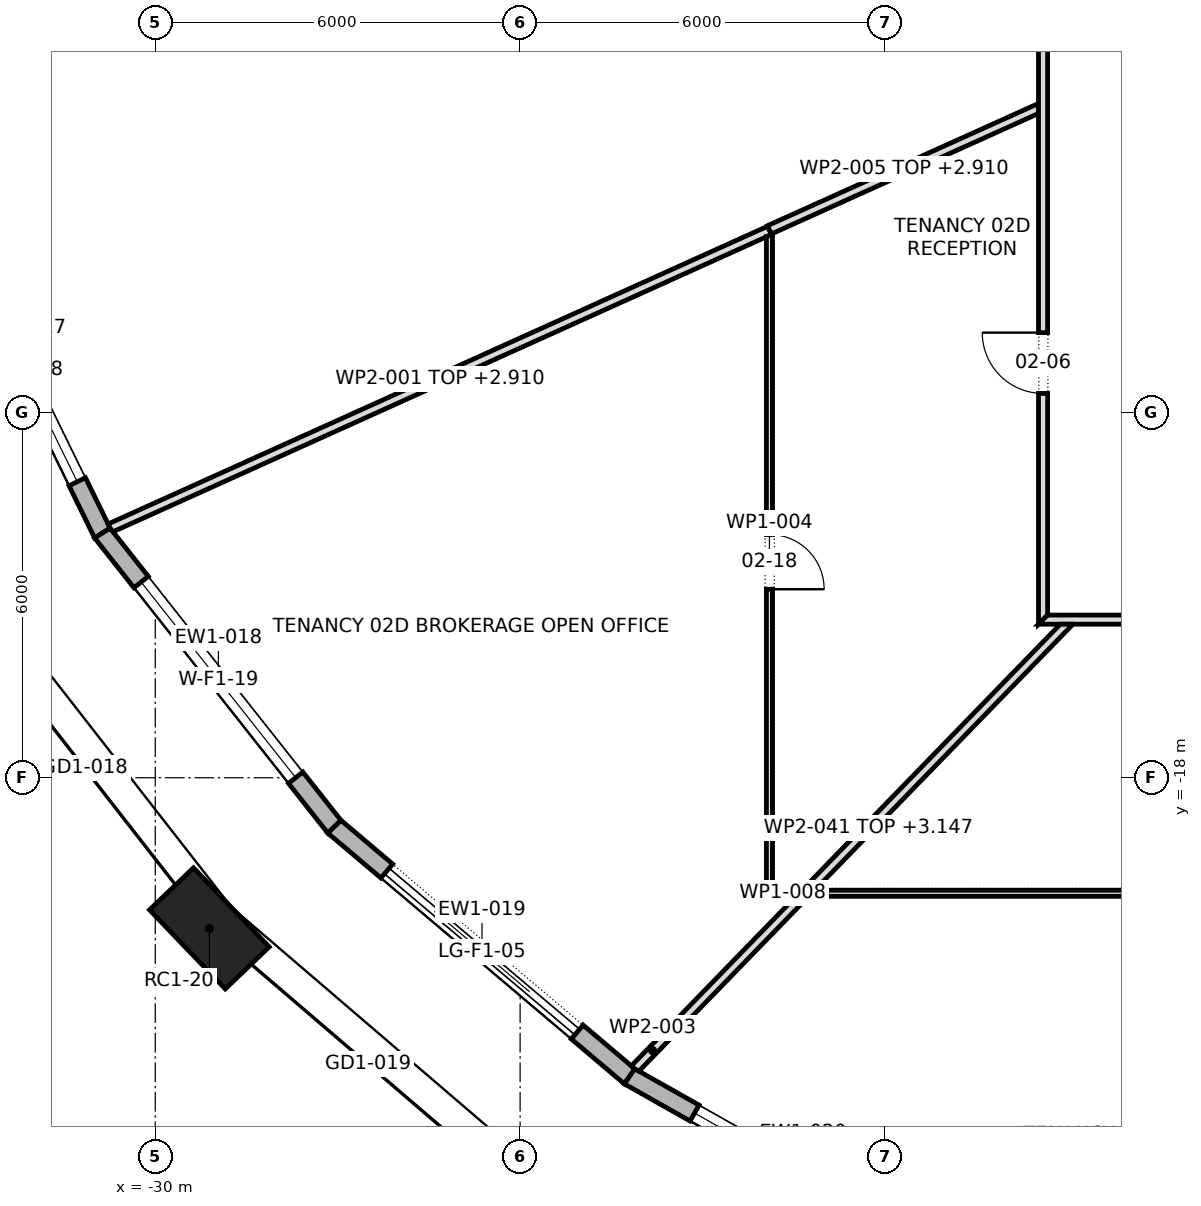
"""IFC4 building model, lengths in metres.
Left out: names, types, materials, properties, quantities, classifications, styles, units other than length and angle.
Written with IfcOpenShell. Run it as: python <this file> out.ifc"""

import sys

from ifc_helpers import new_model, si_unit, direction, frame, frame_2d, origin, origin_2d, place, context, subcontext, project, spatial, polyline, rectangle, outline, extrude, element, fill, save


model = new_model("IFC4")
c1 = context("Model", 3, precision=1e-05, world=origin(), true_north=direction((0.0, 1.0)))
c2 = subcontext(c1, "Body", "Model", "MODEL_VIEW")
j1 = project(units=[si_unit("LENGTHUNIT", "METRE"), si_unit("PLANEANGLEUNIT", "RADIAN")], contexts=[c1])
p1 = place(None, origin())
s1 = spatial("IfcSite", under=j1, at=p1, CompositionType="ELEMENT")
p2 = place(p1, origin())
s2 = spatial("IfcBuilding", under=s1, at=p2, CompositionType="ELEMENT")
p3 = place(p2, frame((0.0, 0.0, 36.1)))
s3 = spatial("IfcBuildingStorey", under=s2, at=p3, CompositionType="ELEMENT", Elevation=36.1)
p4 = place(p3, frame((-29.11, -20.477, 0.0), z_axis=(0.0, 0.0, 1.0), x_axis=(0.691574830638, -0.722304820438, 0.0)))
e1 = element("IfcColumn", 1, at=p4, inside=s3, PredefinedType="COLUMN", context=c2, shape_type="SweptSolid", body=[
    extrude(rectangle(XDim=1.8, YDim=1.0, at=origin_2d()), origin(), (0.0, 0.0, 1.0), 4.2),
])
p5 = place(p3, frame((-33.499, -8.608, 0.0), z_axis=(0.0, 0.0, 1.0), x_axis=(0.439896354052, -0.898048549741, 0.0)))
e2 = element("IfcWall", 2, at=p5, inside=s3, PredefinedType="STANDARD", context=c2, shape_type="SweptSolid", body=[
    extrude(outline(polyline([(-0.017, -0.15), (5.994, -0.15), (5.962, 0.15), (0.017, 0.15), (-0.017, -0.15)])), origin(), (0.0, 0.0, 1.0), 3.9),
])
p6 = place(p5, frame((0.939, 0.0, 0.6)))
e3 = element("IfcOpeningElement", 3, at=p6, cuts=e2, PredefinedType="OPENING", context=c2, shape_type="SweptSolid", body=[
    extrude(rectangle(XDim=4.1, YDim=2.85, at=frame_2d((2.05, 1.425))), frame((0.0, 0.162, 0.0), z_axis=(0.0, -1.0, 0.0), x_axis=(1.0, 0.0, 0.0)), (0.0, 0.0, 1.0), 0.324),
])
p7 = place(p3, frame((-30.869, -13.976, 0.0), z_axis=(0.0, 0.0, 1.0), x_axis=(0.61992334328, -0.784662378642, 0.0)))
e4 = element("IfcWall", 4, at=p7, inside=s3, PredefinedType="STANDARD", context=c2, shape_type="SweptSolid", body=[
    extrude(outline(polyline([(-0.016, -0.15), (6.17, -0.15), (6.14, 0.15), (0.016, 0.15), (-0.016, -0.15)])), origin(), (0.0, 0.0, 1.0), 3.9),
])
p8 = place(p7, frame((1.027, 0.0, 0.6)))
e5 = element("IfcOpeningElement", 5, at=p8, cuts=e4, PredefinedType="OPENING", context=c2, shape_type="SweptSolid", body=[
    extrude(rectangle(XDim=4.1, YDim=2.85, at=frame_2d((2.05, 1.425))), frame((0.0, 0.162, 0.0), z_axis=(0.0, -1.0, 0.0), x_axis=(1.0, 0.0, 0.0)), (0.0, 0.0, 1.0), 0.324),
])
p9 = place(p3, frame((-27.054, -18.806, 0.0), z_axis=(0.0, 0.0, 1.0), x_axis=(0.763577077796, -0.645716691951, 0.0)))
e6 = element("IfcWall", 6, at=p9, inside=s3, PredefinedType="STANDARD", context=c2, shape_type="SweptSolid", body=[
    extrude(outline(polyline([(-0.015, -0.15), (6.371, -0.15), (6.343, 0.15), (0.015, 0.15), (-0.015, -0.15)])), origin(), (0.0, 0.0, 1.0), 3.9),
])
p10 = place(p9, frame((1.129, 0.0, 0.0)))
e7 = element("IfcOpeningElement", 7, at=p10, cuts=e6, PredefinedType="OPENING", context=c2, shape_type="SweptSolid", body=[
    extrude(rectangle(XDim=4.1, YDim=3.45, at=frame_2d((2.05, 1.725))), frame((0.0, 0.162, 0.0), z_axis=(0.0, -1.0, 0.0), x_axis=(1.0, 0.0, 0.0)), (0.0, 0.0, 1.0), 0.324),
])
p11 = place(p3, frame((-22.2, -22.911, 0.0), z_axis=(0.0, 0.0, 1.0), x_axis=(0.87061279013, -0.491968870623, 0.0)))
e8 = element("IfcWall", 8, at=p11, inside=s3, PredefinedType="STANDARD", context=c2, shape_type="SweptSolid", body=[
    extrude(outline(polyline([(-0.014, -0.15), (6.567, -0.15), (6.54, 0.15), (0.014, 0.15), (-0.014, -0.15)])), origin(), (0.0, 0.0, 1.0), 3.9),
])
p12 = place(p11, frame((1.227, 0.0, 0.6)))
e9 = element("IfcOpeningElement", 9, at=p12, cuts=e8, PredefinedType="OPENING", context=c2, shape_type="SweptSolid", body=[
    extrude(rectangle(XDim=4.1, YDim=2.85, at=frame_2d((2.05, 1.425))), frame((0.0, 0.162, 0.0), z_axis=(0.0, -1.0, 0.0), x_axis=(1.0, 0.0, 0.0)), (0.0, 0.0, 1.0), 0.324),
])
p13 = place(p3, frame((-30.744, -13.896, 0.0), z_axis=(0.0, 0.0, 1.0), x_axis=(0.91143189519, 0.411450969654, 0.0)))
e10 = element("IfcWall", 10, at=p13, inside=s3, PredefinedType="PARTITIONING", context=c2, shape_type="SweptSolid", body=[
    extrude(outline(polyline([(0.021, -0.075), (1.985, -0.075), (3.95, -0.075), (5.915, -0.075), (7.88, -0.075), (9.845, -0.075), (11.81, -0.075), (11.811, -0.073), (11.815, -0.075), (11.902, -0.075), (11.902, -0.066), (11.902, -0.066), (11.902, 0.062), (11.902, 0.075), (9.919, 0.075), (7.935, 0.075), (5.951, 0.075), (3.968, 0.075), (1.984, 0.075), (0.0, 0.075), (0.0, 0.066), (0.002, -0.001), (0.021, -0.075)])), origin(), (0.0, 0.0, 1.0), 2.91),
])
p14 = place(p3, frame((-22.117, -22.791, 0.0), z_axis=(0.0, 0.0, 1.0), x_axis=(0.696550314682, 0.71750795056, 0.0)))
e11 = element("IfcWall", 11, at=p14, inside=s3, PredefinedType="PARTITIONING", context=c2, shape_type="SweptSolid", body=[
    extrude(outline(polyline([(0.0, 0.075), (0.0, 0.071), (0.005, 0.0), (0.025, -0.075), (0.839, -0.075), (0.839, 0.075), (0.0, 0.075)])), origin(), (0.0, 0.0, 1.0), 3.9),
])
p15 = place(p3, frame((-19.9, -19.95, 0.0), z_axis=(0.0, 0.0, 1.0), x_axis=(0.0, 1.0, 0.0)))
e12 = element("IfcWall", 12, at=p15, inside=s3, PredefinedType="PARTITIONING", context=c2, shape_type="SweptSolid", body=[
    extrude(outline(polyline([(10.9, -0.05), (10.9, -0.049), (10.892, -0.031), (10.883, -0.034), (10.845, 0.05), (9.038, 0.05), (7.23, 0.05), (5.423, 0.05), (3.615, 0.05), (1.808, 0.05), (0.0, 0.05), (0.1, -0.05), (0.1, -0.05), (1.9, -0.05), (3.7, -0.05), (5.5, -0.05), (7.3, -0.05), (9.1, -0.05), (10.9, -0.05)])), origin(), (0.0, 0.0, 1.0), 3.9),
])
p16 = place(p15, frame((5.05, 0.0, 0.0)))
e13 = element("IfcOpeningElement", 13, at=p16, cuts=e12, PredefinedType="OPENING", context=c2, shape_type="SweptSolid", body=[
    extrude(rectangle(XDim=0.9, YDim=2.1, at=frame_2d((0.45, 1.05))), frame((0.0, 0.062, 0.0), z_axis=(0.0, -1.0, 0.0), x_axis=(1.0, 0.0, 0.0)), (0.0, 0.0, 1.0), 0.124),
])
p17 = place(p3, frame((-19.9, -8.99, 0.0), z_axis=(0.0, 0.0, 1.0), x_axis=(0.911546381607, 0.411197269178, 0.0)))
e14 = element("IfcWall", 14, at=p17, inside=s3, PredefinedType="PARTITIONING", context=c2, shape_type="SweptSolid", body=[
    extrude(outline(polyline([(0.02, -0.075), (1.62, -0.075), (3.22, -0.075), (4.821, -0.075), (4.888, 0.075), (3.259, 0.075), (1.629, 0.075), (0.0, 0.075), (0.0, -0.066), (0.02, -0.075)])), origin(), (0.0, 0.0, 1.0), 2.91),
])
p18 = place(p3, frame((-19.46, -19.9, 0.0), z_axis=(0.0, 0.0, 1.0), x_axis=(-1.0, 0.0, 0.0)))
e15 = element("IfcWall", 15, at=p18, inside=s3, PredefinedType="PARTITIONING", context=c2, shape_type="SweptSolid", body=[
    extrude(outline(polyline([(0.0, -0.05), (0.39, -0.05), (0.49, 0.05), (0.0, 0.05), (0.0, -0.05)])), origin(), (0.0, 0.0, 1.0), 3.9),
])
p19 = place(p3, frame((-15.4, -15.475, 0.0), z_axis=(0.0, 0.0, 1.0), x_axis=(0.0, 1.0, 0.0)))
e16 = element("IfcWall", 16, at=p19, inside=s3, PredefinedType="PARTITIONING", context=c2, shape_type="SweptSolid", body=[
    extrude(outline(polyline([(0.15, -0.075), (2.066, -0.075), (3.981, -0.075), (5.897, -0.075), (7.812, -0.075), (9.728, -0.075), (11.644, -0.075), (13.56, -0.075), (15.475, -0.075), (17.391, -0.075), (19.306, -0.075), (21.222, -0.075), (23.138, -0.075), (25.053, -0.075), (26.969, -0.075), (28.885, -0.075), (30.8, -0.075), (30.95, 0.075), (29.016, 0.075), (27.081, 0.075), (25.147, 0.075), (23.212, 0.075), (21.278, 0.075), (19.344, 0.075), (17.409, 0.075), (15.475, 0.075), (13.541, 0.075), (11.606, 0.075), (9.672, 0.075), (7.738, 0.075), (5.803, 0.075), (3.869, 0.075), (1.935, 0.075), (0.0, 0.075), (0.15, -0.075)])), origin(), (0.0, 0.0, 1.0), 3.9),
])
p20 = place(p19, frame((28.02, 0.0, 0.0)))
e17 = element("IfcOpeningElement", 17, at=p20, cuts=e16, PredefinedType="OPENING", context=c2, shape_type="SweptSolid", body=[
    extrude(rectangle(XDim=1.0, YDim=2.1, at=frame_2d((0.5, 1.05))), frame((0.0, 0.087, 0.0), z_axis=(0.0, -1.0, 0.0), x_axis=(1.0, 0.0, 0.0)), (0.0, 0.0, 1.0), 0.174),
])
p21 = place(p19, frame((21.895, 0.0, 0.0)))
e18 = element("IfcOpeningElement", 18, at=p21, cuts=e16, PredefinedType="OPENING", context=c2, shape_type="SweptSolid", body=[
    extrude(rectangle(XDim=1.8, YDim=2.1, at=frame_2d((0.9, 1.05))), frame((0.0, 0.087, 0.0), z_axis=(0.0, -1.0, 0.0), x_axis=(1.0, 0.0, 0.0)), (0.0, 0.0, 1.0), 0.174),
])
p22 = place(p19, frame((15.798, 0.0, 0.0)))
e19 = element("IfcOpeningElement", 19, at=p22, cuts=e16, PredefinedType="OPENING", context=c2, shape_type="SweptSolid", body=[
    extrude(rectangle(XDim=1.8, YDim=2.1, at=frame_2d((0.9, 1.05))), frame((0.0, 0.087, 0.0), z_axis=(0.0, -1.0, 0.0), x_axis=(1.0, 0.0, 0.0)), (0.0, 0.0, 1.0), 0.174),
])
p23 = place(p19, frame((10.343, 0.0, 0.0)))
e20 = element("IfcOpeningElement", 20, at=p23, cuts=e16, PredefinedType="OPENING", context=c2, shape_type="SweptSolid", body=[
    extrude(rectangle(XDim=1.8, YDim=2.1, at=frame_2d((0.9, 1.05))), frame((0.0, 0.087, 0.0), z_axis=(0.0, -1.0, 0.0), x_axis=(1.0, 0.0, 0.0)), (0.0, 0.0, 1.0), 0.174),
])
p24 = place(p19, frame((3.795, 0.0, 0.0)))
e21 = element("IfcOpeningElement", 21, at=p24, cuts=e16, PredefinedType="OPENING", context=c2, shape_type="SweptSolid", body=[
    extrude(rectangle(XDim=1.0, YDim=2.1, at=frame_2d((0.5, 1.05))), frame((0.0, 0.087, 0.0), z_axis=(0.0, -1.0, 0.0), x_axis=(1.0, 0.0, 0.0)), (0.0, 0.0, 1.0), 0.174),
])
p25 = place(p3, frame((-15.475, -15.4, 0.0), z_axis=(0.0, 0.0, 1.0), x_axis=(1.0, 0.0, 0.0)))
e22 = element("IfcWall", 22, at=p25, inside=s3, PredefinedType="PARTITIONING", context=c2, shape_type="SweptSolid", body=[
    extrude(outline(polyline([(0.0, -0.075), (1.935, -0.075), (3.869, -0.075), (5.803, -0.075), (7.738, -0.075), (9.672, -0.075), (11.606, -0.075), (13.541, -0.075), (15.475, -0.075), (17.409, -0.075), (19.344, -0.075), (21.278, -0.075), (23.212, -0.075), (25.147, -0.075), (27.081, -0.075), (29.016, -0.075), (30.95, -0.075), (30.8, 0.075), (28.885, 0.075), (26.969, 0.075), (25.053, 0.075), (23.138, 0.075), (21.222, 0.075), (19.306, 0.075), (17.391, 0.075), (15.475, 0.075), (13.56, 0.075), (11.644, 0.075), (9.728, 0.075), (7.812, 0.075), (5.897, 0.075), (3.981, 0.075), (2.066, 0.075), (0.15, 0.075), (0.0, -0.075)])), origin(), (0.0, 0.0, 1.0), 3.9),
])
p26 = place(p25, frame((4.745, 0.0, 0.0)))
e23 = element("IfcOpeningElement", 23, at=p26, cuts=e22, PredefinedType="OPENING", context=c2, shape_type="SweptSolid", body=[
    extrude(rectangle(XDim=1.0, YDim=2.1, at=frame_2d((0.5, 1.05))), frame((0.0, 0.087, 0.0), z_axis=(0.0, -1.0, 0.0), x_axis=(1.0, 0.0, 0.0)), (0.0, 0.0, 1.0), 0.174),
])
p27 = place(p25, frame((13.11, 0.0, 0.0)))
e24 = element("IfcOpeningElement", 24, at=p27, cuts=e22, PredefinedType="OPENING", context=c2, shape_type="SweptSolid", body=[
    extrude(rectangle(XDim=1.0, YDim=2.1, at=frame_2d((0.5, 1.05))), frame((0.0, 0.087, 0.0), z_axis=(0.0, -1.0, 0.0), x_axis=(1.0, 0.0, 0.0)), (0.0, 0.0, 1.0), 0.174),
])
p28 = place(p25, frame((20.735, 0.0, 0.0)))
e25 = element("IfcOpeningElement", 25, at=p28, cuts=e22, PredefinedType="OPENING", context=c2, shape_type="SweptSolid", body=[
    extrude(rectangle(XDim=1.0, YDim=2.1, at=frame_2d((0.5, 1.05))), frame((0.0, 0.087, 0.0), z_axis=(0.0, -1.0, 0.0), x_axis=(1.0, 0.0, 0.0)), (0.0, 0.0, 1.0), 0.174),
])
p29 = place(p25, frame((27.54, 0.0, 0.0)))
e26 = element("IfcOpeningElement", 26, at=p29, cuts=e22, PredefinedType="OPENING", context=c2, shape_type="SweptSolid", body=[
    extrude(rectangle(XDim=1.0, YDim=2.1, at=frame_2d((0.5, 1.05))), frame((0.0, 0.087, 0.0), z_axis=(0.0, -1.0, 0.0), x_axis=(1.0, 0.0, 0.0)), (0.0, 0.0, 1.0), 0.174),
])
p30 = place(p3, frame((-7.198, -19.9, 0.0), z_axis=(0.0, 0.0, 1.0), x_axis=(-1.0, 0.0, 0.0)))
e27 = element("IfcWall", 27, at=p30, inside=s3, PredefinedType="PARTITIONING", context=c2, shape_type="SweptSolid", body=[
    extrude(outline(polyline([(0.0, -0.05), (1.993, -0.05), (3.986, -0.05), (5.979, -0.05), (7.972, -0.05), (9.965, -0.05), (11.958, -0.05), (12.055, 0.05), (12.055, 0.05), (10.338, 0.05), (8.621, 0.05), (6.904, 0.05), (5.187, 0.05), (3.47, 0.05), (1.753, 0.05), (0.035, 0.05), (0.0, -0.049), (0.0, -0.05)])), origin(), (0.0, 0.0, 1.0), 3.9),
])
p31 = place(p30, frame((5.577, 0.0, 0.0)))
e28 = element("IfcOpeningElement", 28, at=p31, cuts=e27, PredefinedType="OPENING", context=c2, shape_type="SweptSolid", body=[
    extrude(rectangle(XDim=0.9, YDim=2.1, at=frame_2d((0.45, 1.05))), frame((0.0, 0.062, 0.0), z_axis=(0.0, -1.0, 0.0), x_axis=(1.0, 0.0, 0.0)), (0.0, 0.0, 1.0), 0.124),
])
p32 = place(p3, frame((-21.532, -22.189, 0.0), z_axis=(0.0, 0.0, 1.0), x_axis=(0.696649821167, 0.717411337148, 0.0)))
e29 = element("IfcWall", 29, at=p32, inside=s3, PredefinedType="PARTITIONING", context=c2, shape_type="SweptSolid", body=[
    extrude(outline(polyline([(0.0, -0.075), (1.664, -0.075), (3.328, -0.075), (3.331, -0.073), (3.333, -0.075), (4.857, -0.075), (6.382, -0.075), (7.906, -0.075), (9.431, -0.075), (9.431, -0.074), (9.338, 0.021), (9.338, 0.021), (9.286, 0.075), (7.727, 0.075), (6.169, 0.075), (4.611, 0.075), (3.052, 0.075), (3.05, 0.073), (3.048, 0.075), (1.524, 0.075), (0.0, 0.075), (0.0, -0.075)])), origin(), (0.0, 0.0, 1.0), 3.147),
])
p33 = place(p6, origin())
e30 = element("IfcWindow", 30, at=p33, inside=s3, PartitioningType="TRIPLE_PANEL_VERTICAL", PredefinedType="WINDOW", context=c2, shape_type="SweptSolid", body=[
    extrude(rectangle(XDim=4.1, YDim=2.85, at=frame_2d((2.05, 1.425))), frame((0.0, 0.03, 0.0), z_axis=(0.0, -1.0, 0.0), x_axis=(1.0, 0.0, 0.0)), (0.0, 0.0, 1.0), 0.06),
])
fill(e3, e30)
p34 = place(p8, origin())
e31 = element("IfcWindow", 31, at=p34, inside=s3, PartitioningType="TRIPLE_PANEL_VERTICAL", PredefinedType="WINDOW", context=c2, shape_type="SweptSolid", body=[
    extrude(rectangle(XDim=4.1, YDim=2.85, at=frame_2d((2.05, 1.425))), frame((0.0, 0.03, 0.0), z_axis=(0.0, -1.0, 0.0), x_axis=(1.0, 0.0, 0.0)), (0.0, 0.0, 1.0), 0.06),
])
fill(e5, e31)
p35 = place(p10, origin())
e32 = element("IfcDoor", 32, at=p35, inside=s3, OperationType="DOUBLE_DOOR_SLIDING", PredefinedType="DOOR", context=c2, shape_type="SweptSolid", body=[
    extrude(rectangle(XDim=4.1, YDim=3.45, at=frame_2d((2.05, 1.725))), frame((0.0, 0.025, 0.0), z_axis=(0.0, -1.0, 0.0), x_axis=(1.0, 0.0, 0.0)), (0.0, 0.0, 1.0), 0.05),
])
fill(e7, e32)
p36 = place(p12, origin())
e33 = element("IfcWindow", 33, at=p36, inside=s3, PartitioningType="TRIPLE_PANEL_VERTICAL", PredefinedType="WINDOW", context=c2, shape_type="SweptSolid", body=[
    extrude(rectangle(XDim=4.1, YDim=2.85, at=frame_2d((2.05, 1.425))), frame((0.0, 0.03, 0.0), z_axis=(0.0, -1.0, 0.0), x_axis=(1.0, 0.0, 0.0)), (0.0, 0.0, 1.0), 0.06),
])
fill(e9, e33)
p37 = place(p24, origin())
e34 = element("IfcDoor", 34, at=p37, inside=s3, OperationType="SINGLE_SWING_LEFT", PredefinedType="DOOR", context=c2, shape_type="SweptSolid", body=[
    extrude(rectangle(XDim=1.0, YDim=2.1, at=frame_2d((0.5, 1.05))), frame((0.0, 0.025, 0.0), z_axis=(0.0, -1.0, 0.0), x_axis=(1.0, 0.0, 0.0)), (0.0, 0.0, 1.0), 0.05),
])
fill(e21, e34)
p38 = place(p16, frame((0.9, 0.0, 0.0), z_axis=(0.0, 0.0, 1.0), x_axis=(-1.0, 0.0, 0.0)))
e35 = element("IfcDoor", 35, at=p38, inside=s3, OperationType="SINGLE_SWING_LEFT", PredefinedType="DOOR", context=c2, shape_type="SweptSolid", body=[
    extrude(rectangle(XDim=0.9, YDim=2.1, at=frame_2d((0.45, 1.05))), frame((0.0, 0.025, 0.0), z_axis=(0.0, -1.0, 0.0), x_axis=(1.0, 0.0, 0.0)), (0.0, 0.0, 1.0), 0.05),
])
fill(e13, e35)
save(model, sys.argv[1])
